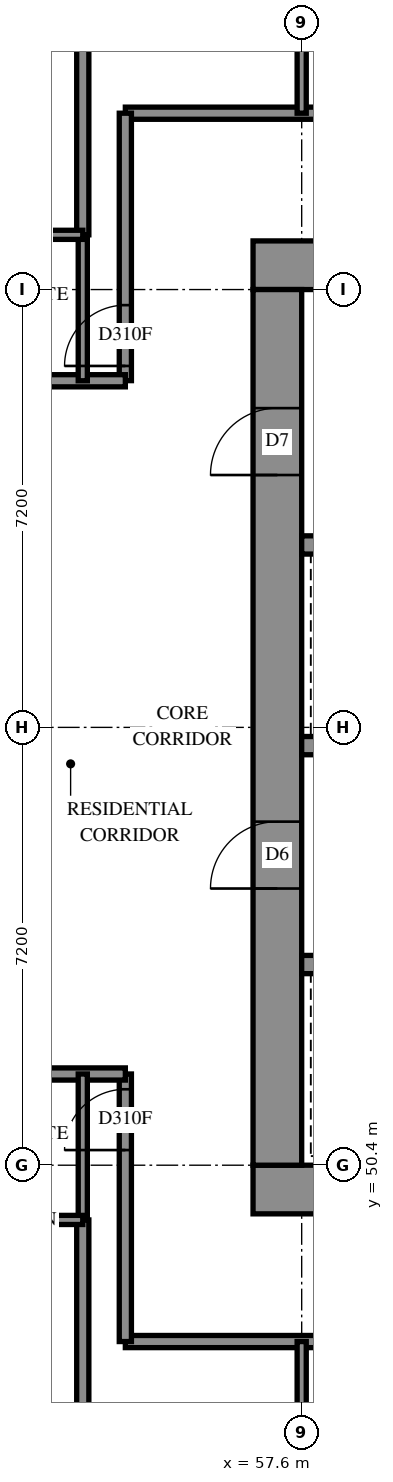
"""IFC4 building model, lengths in metres.
Left out: names, types, materials, properties, quantities, classifications, styles, units other than length and angle.
Written with IfcOpenShell. Run it as: python <this file> out.ifc"""

import sys

from ifc_helpers import new_model, si_unit, direction, frame, frame_2d, origin, place, context, subcontext, project, spatial, rectangle, extrude, element, fill, save


model = new_model("IFC4")
c1 = context("Model", 3, precision=1e-05, world=origin(), true_north=direction((0.0, 1.0)))
c2 = subcontext(c1, "Body", "Model", "MODEL_VIEW")
j1 = project(units=[si_unit("LENGTHUNIT", "METRE"), si_unit("PLANEANGLEUNIT", "RADIAN")], contexts=[c1])
p1 = place(None, origin())
s1 = spatial("IfcSite", under=j1, at=p1, CompositionType="ELEMENT")
p2 = place(p1, origin())
s2 = spatial("IfcBuilding", under=s1, at=p2, CompositionType="ELEMENT")
p3 = place(p2, frame((0.0, 0.0, 91.4)))
s3 = spatial("IfcBuildingStorey", under=s2, at=p3, CompositionType="ELEMENT", Elevation=91.4)
p4 = place(p3, frame((56.8, 50.0, -0.3), z_axis=(0.0, 0.0, 1.0), x_axis=(1.0, 0.0, 0.0)))
e1 = element("IfcWall", 1, at=p4, inside=s3, PredefinedType="SHEAR", context=c2, shape_type="SweptSolid", body=[
    extrude(rectangle(XDim=16.0, YDim=0.8, at=frame_2d((8.0, 0.0))), origin(), (0.0, 0.0, 1.0), 2.7),
])
p5 = place(p3, frame((56.8, 65.2, -0.3), z_axis=(0.0, 0.0, 1.0), x_axis=(1.0, 0.0, 0.0)))
e2 = element("IfcWall", 2, at=p5, inside=s3, PredefinedType="SHEAR", context=c2, shape_type="SweptSolid", body=[
    extrude(rectangle(XDim=16.0, YDim=0.8, at=frame_2d((8.0, 0.0))), origin(), (0.0, 0.0, 1.0), 2.7),
])
p6 = place(p5, frame((10.8, 0.0, 0.3)))
e3 = element("IfcOpeningElement", 3, at=p6, cuts=e2, PredefinedType="OPENING", context=c2, shape_type="SweptSolid", body=[
    extrude(rectangle(XDim=0.8, YDim=2.1, at=frame_2d((0.4, 1.05))), frame((0.0, 0.41, 0.0), z_axis=(0.0, -1.0, 0.0), x_axis=(1.0, 0.0, 0.0)), (0.0, 0.0, 1.0), 0.82),
])
p7 = place(p3, frame((57.2, 50.4, -0.3), z_axis=(0.0, 0.0, 1.0), x_axis=(0.0, 1.0, 0.0)))
e4 = element("IfcWall", 4, at=p7, inside=s3, PredefinedType="SHEAR", context=c2, shape_type="SweptSolid", body=[
    extrude(rectangle(XDim=14.4, YDim=0.8, at=frame_2d((7.2, 0.0))), origin(), (0.0, 0.0, 1.0), 2.7),
])
p8 = place(p7, frame((4.55, 0.0, 0.3)))
e5 = element("IfcOpeningElement", 5, at=p8, cuts=e4, PredefinedType="OPENING", context=c2, shape_type="SweptSolid", body=[
    extrude(rectangle(XDim=1.1, YDim=2.1, at=frame_2d((0.55, 1.05))), frame((0.0, 0.41, 0.0), z_axis=(0.0, -1.0, 0.0), x_axis=(1.0, 0.0, 0.0)), (0.0, 0.0, 1.0), 0.82),
])
p9 = place(p7, frame((11.35, 0.0, 0.3)))
e6 = element("IfcOpeningElement", 6, at=p9, cuts=e4, PredefinedType="OPENING", context=c2, shape_type="SweptSolid", body=[
    extrude(rectangle(XDim=1.1, YDim=2.1, at=frame_2d((0.55, 1.05))), frame((0.0, 0.41, 0.0), z_axis=(0.0, -1.0, 0.0), x_axis=(1.0, 0.0, 0.0)), (0.0, 0.0, 1.0), 0.82),
])
p10 = place(p3, frame((57.6, 53.7, 0.0), z_axis=(0.0, 0.0, 1.0), x_axis=(1.0, 0.0, 0.0)))
e7 = element("IfcWall", 7, at=p10, inside=s3, PredefinedType="SOLIDWALL", context=c2, shape_type="SweptSolid", body=[
    extrude(rectangle(XDim=14.4, YDim=0.3, at=frame_2d((7.2, 0.0))), origin(), (0.0, 0.0, 1.0), 3.1),
])
p11 = place(p10, frame((1.25, 0.0, 0.0)))
e8 = element("IfcOpeningElement", 8, at=p11, cuts=e7, PredefinedType="OPENING", context=c2, shape_type="SweptSolid", body=[
    extrude(rectangle(XDim=1.1, YDim=2.1, at=frame_2d((0.55, 1.05))), frame((0.0, 0.16, 0.0), z_axis=(0.0, -1.0, 0.0), x_axis=(1.0, 0.0, 0.0)), (0.0, 0.0, 1.0), 0.32),
])
p12 = place(p10, frame((4.85, 0.0, 0.0)))
e9 = element("IfcOpeningElement", 9, at=p12, cuts=e7, PredefinedType="OPENING", context=c2, shape_type="SweptSolid", body=[
    extrude(rectangle(XDim=1.1, YDim=2.1, at=frame_2d((0.55, 1.05))), frame((0.0, 0.16, 0.0), z_axis=(0.0, -1.0, 0.0), x_axis=(1.0, 0.0, 0.0)), (0.0, 0.0, 1.0), 0.32),
])
p13 = place(p10, frame((8.45, 0.0, 0.0)))
e10 = element("IfcOpeningElement", 10, at=p13, cuts=e7, PredefinedType="OPENING", context=c2, shape_type="SweptSolid", body=[
    extrude(rectangle(XDim=1.1, YDim=2.1, at=frame_2d((0.55, 1.05))), frame((0.0, 0.16, 0.0), z_axis=(0.0, -1.0, 0.0), x_axis=(1.0, 0.0, 0.0)), (0.0, 0.0, 1.0), 0.32),
])
p14 = place(p10, frame((12.05, 0.0, 0.0)))
e11 = element("IfcOpeningElement", 11, at=p14, cuts=e7, PredefinedType="OPENING", context=c2, shape_type="SweptSolid", body=[
    extrude(rectangle(XDim=1.1, YDim=2.1, at=frame_2d((0.55, 1.05))), frame((0.0, 0.16, 0.0), z_axis=(0.0, -1.0, 0.0), x_axis=(1.0, 0.0, 0.0)), (0.0, 0.0, 1.0), 0.32),
])
p15 = place(p3, frame((57.6, 57.3, 0.0), z_axis=(0.0, 0.0, 1.0), x_axis=(1.0, 0.0, 0.0)))
e12 = element("IfcWall", 12, at=p15, inside=s3, PredefinedType="SOLIDWALL", context=c2, shape_type="SweptSolid", body=[
    extrude(rectangle(XDim=14.4, YDim=0.3, at=frame_2d((7.2, 0.0))), origin(), (0.0, 0.0, 1.0), 3.1),
])
p16 = place(p15, frame((12.05, 0.0, 0.0)))
e13 = element("IfcOpeningElement", 13, at=p16, cuts=e12, PredefinedType="OPENING", context=c2, shape_type="SweptSolid", body=[
    extrude(rectangle(XDim=1.1, YDim=2.1, at=frame_2d((0.55, 1.05))), frame((0.0, 0.16, 0.0), z_axis=(0.0, -1.0, 0.0), x_axis=(1.0, 0.0, 0.0)), (0.0, 0.0, 1.0), 0.32),
])
p17 = place(p3, frame((57.6, 60.6, 0.0), z_axis=(0.0, 0.0, 1.0), x_axis=(1.0, 0.0, 0.0)))
e14 = element("IfcWall", 14, at=p17, inside=s3, PredefinedType="SOLIDWALL", context=c2, shape_type="SweptSolid", body=[
    extrude(rectangle(XDim=7.2, YDim=0.3, at=frame_2d((3.6, 0.0))), origin(), (0.0, 0.0, 1.0), 3.1),
])
p18 = place(p3, frame((54.7, 67.7, 0.0), z_axis=(0.0, 0.0, 1.0), x_axis=(1.0, 0.0, 0.0)))
e15 = element("IfcWall", 15, at=p18, inside=s3, PredefinedType="PARTITIONING", context=c2, shape_type="SweptSolid", body=[
    extrude(rectangle(XDim=20.2, YDim=0.2, at=frame_2d((10.1, 0.0))), origin(), (0.0, 0.0, 1.0), 3.1),
])
p19 = place(p18, frame((5.25, 0.0, 0.0)))
e16 = element("IfcOpeningElement", 16, at=p19, cuts=e15, PredefinedType="OPENING", context=c2, shape_type="SweptSolid", body=[
    extrude(rectangle(XDim=0.9, YDim=2.1, at=frame_2d((0.45, 1.05))), frame((0.0, 0.11, 0.0), z_axis=(0.0, -1.0, 0.0), x_axis=(1.0, 0.0, 0.0)), (0.0, 0.0, 1.0), 0.22),
])
p20 = place(p18, frame((6.9, 0.0, 0.0)))
e17 = element("IfcOpeningElement", 17, at=p20, cuts=e15, PredefinedType="OPENING", context=c2, shape_type="SweptSolid", body=[
    extrude(rectangle(XDim=0.9, YDim=2.1, at=frame_2d((0.45, 1.05))), frame((0.0, 0.11, 0.0), z_axis=(0.0, -1.0, 0.0), x_axis=(1.0, 0.0, 0.0)), (0.0, 0.0, 1.0), 0.22),
])
p21 = place(p18, frame((12.45, 0.0, 0.0)))
e18 = element("IfcOpeningElement", 18, at=p21, cuts=e15, PredefinedType="OPENING", context=c2, shape_type="SweptSolid", body=[
    extrude(rectangle(XDim=0.9, YDim=2.1, at=frame_2d((0.45, 1.05))), frame((0.0, 0.11, 0.0), z_axis=(0.0, -1.0, 0.0), x_axis=(1.0, 0.0, 0.0)), (0.0, 0.0, 1.0), 0.22),
])
p22 = place(p18, frame((14.1, 0.0, 0.0)))
e19 = element("IfcOpeningElement", 19, at=p22, cuts=e15, PredefinedType="OPENING", context=c2, shape_type="SweptSolid", body=[
    extrude(rectangle(XDim=0.9, YDim=2.1, at=frame_2d((0.45, 1.05))), frame((0.0, 0.11, 0.0), z_axis=(0.0, -1.0, 0.0), x_axis=(1.0, 0.0, 0.0)), (0.0, 0.0, 1.0), 0.22),
])
p23 = place(p3, frame((54.7, 47.5, 0.0), z_axis=(0.0, 0.0, 1.0), x_axis=(1.0, 0.0, 0.0)))
e20 = element("IfcWall", 20, at=p23, inside=s3, PredefinedType="PARTITIONING", context=c2, shape_type="SweptSolid", body=[
    extrude(rectangle(XDim=19.442, YDim=0.2, at=frame_2d((9.721, 0.0))), origin(), (0.0, 0.0, 1.0), 3.1),
])
p24 = place(p23, frame((5.2, 0.0, 0.0)))
e21 = element("IfcOpeningElement", 21, at=p24, cuts=e20, PredefinedType="OPENING", context=c2, shape_type="SweptSolid", body=[
    extrude(rectangle(XDim=0.9, YDim=2.1, at=frame_2d((0.45, 1.05))), frame((0.0, 0.11, 0.0), z_axis=(0.0, -1.0, 0.0), x_axis=(1.0, 0.0, 0.0)), (0.0, 0.0, 1.0), 0.22),
])
p25 = place(p23, frame((6.9, 0.0, 0.0)))
e22 = element("IfcOpeningElement", 22, at=p25, cuts=e20, PredefinedType="OPENING", context=c2, shape_type="SweptSolid", body=[
    extrude(rectangle(XDim=0.9, YDim=2.1, at=frame_2d((0.45, 1.05))), frame((0.0, 0.11, 0.0), z_axis=(0.0, -1.0, 0.0), x_axis=(1.0, 0.0, 0.0)), (0.0, 0.0, 1.0), 0.22),
])
p26 = place(p23, frame((13.963, 0.0, 0.0)))
e23 = element("IfcOpeningElement", 23, at=p26, cuts=e20, PredefinedType="OPENING", context=c2, shape_type="SweptSolid", body=[
    extrude(rectangle(XDim=1.0, YDim=2.1, at=frame_2d((0.5, 1.05))), frame((0.0, 0.11, 0.0), z_axis=(0.0, -1.0, 0.0), x_axis=(1.0, 0.0, 0.0)), (0.0, 0.0, 1.0), 0.22),
])
p27 = place(p3, frame((54.0, 42.395, 0.0), z_axis=(0.0, 0.0, 1.0), x_axis=(0.0, 1.0, 0.0)))
e24 = element("IfcWall", 24, at=p27, inside=s3, PredefinedType="PARTITIONING", context=c2, shape_type="SweptSolid", body=[
    extrude(rectangle(XDim=7.104, YDim=0.2, at=frame_2d((3.552, 0.0))), origin(), (0.0, 0.0, 1.0), 3.1),
])
p28 = place(p3, frame((54.0, 65.7, 0.0), z_axis=(0.0, 0.0, 1.0), x_axis=(0.0, 1.0, 0.0)))
e25 = element("IfcWall", 25, at=p28, inside=s3, PredefinedType="PARTITIONING", context=c2, shape_type="SweptSolid", body=[
    extrude(rectangle(XDim=6.993, YDim=0.2, at=frame_2d((3.497, 0.0))), origin(), (0.0, 0.0, 1.0), 3.1),
])
p29 = place(p3, frame((54.7, 47.5, 0.0), z_axis=(0.0, 0.0, 1.0), x_axis=(0.0, 1.0, 0.0)))
e26 = element("IfcWall", 26, at=p29, inside=s3, PredefinedType="PARTITIONING", context=c2, shape_type="SweptSolid", body=[
    extrude(rectangle(XDim=4.4, YDim=0.2, at=frame_2d((2.2, 0.0))), origin(), (0.0, 0.0, 1.0), 3.1),
])
p30 = place(p29, frame((3.149, 0.0, 0.0)))
e27 = element("IfcOpeningElement", 27, at=p30, cuts=e26, PredefinedType="OPENING", context=c2, shape_type="SweptSolid", body=[
    extrude(rectangle(XDim=1.0, YDim=2.1, at=frame_2d((0.5, 1.05))), frame((0.0, 0.11, 0.0), z_axis=(0.0, -1.0, 0.0), x_axis=(1.0, 0.0, 0.0)), (0.0, 0.0, 1.0), 0.22),
])
p31 = place(p3, frame((54.7, 63.302, 0.0), z_axis=(0.0, 0.0, 1.0), x_axis=(0.0, 1.0, 0.0)))
e28 = element("IfcWall", 28, at=p31, inside=s3, PredefinedType="PARTITIONING", context=c2, shape_type="SweptSolid", body=[
    extrude(rectangle(XDim=4.398, YDim=0.2, at=frame_2d((2.199, 0.0))), origin(), (0.0, 0.0, 1.0), 3.1),
])
p32 = place(p31, frame((0.242, 0.0, 0.0)))
e29 = element("IfcOpeningElement", 29, at=p32, cuts=e28, PredefinedType="OPENING", context=c2, shape_type="SweptSolid", body=[
    extrude(rectangle(XDim=1.0, YDim=2.1, at=frame_2d((0.5, 1.05))), frame((0.0, 0.11, 0.0), z_axis=(0.0, -1.0, 0.0), x_axis=(1.0, 0.0, 0.0)), (0.0, 0.0, 1.0), 0.22),
])
p33 = place(p3, frame((50.4, 51.9, 0.0), z_axis=(0.0, 0.0, 1.0), x_axis=(1.0, 0.0, 0.0)))
e30 = element("IfcWall", 30, at=p33, inside=s3, PredefinedType="PARTITIONING", context=c2, shape_type="SweptSolid", body=[
    extrude(rectangle(XDim=4.3, YDim=0.2, at=frame_2d((2.15, 0.0))), origin(), (0.0, 0.0, 1.0), 3.1),
])
p34 = place(p33, frame((0.552, 0.0, 0.0)))
e31 = element("IfcOpeningElement", 31, at=p34, cuts=e30, PredefinedType="OPENING", context=c2, shape_type="SweptSolid", body=[
    extrude(rectangle(XDim=0.9, YDim=2.1, at=frame_2d((0.45, 1.05))), frame((0.0, 0.11, 0.0), z_axis=(0.0, -1.0, 0.0), x_axis=(1.0, 0.0, 0.0)), (0.0, 0.0, 1.0), 0.22),
])
p35 = place(p3, frame((50.4, 63.3, 0.0), z_axis=(0.0, 0.0, 1.0), x_axis=(1.0, 0.0, 0.0)))
e32 = element("IfcWall", 32, at=p35, inside=s3, PredefinedType="PARTITIONING", context=c2, shape_type="SweptSolid", body=[
    extrude(rectangle(XDim=4.3, YDim=0.2, at=frame_2d((2.15, 0.0))), origin(), (0.0, 0.0, 1.0), 3.1),
])
p36 = place(p35, frame((0.552, 0.0, 0.0)))
e33 = element("IfcOpeningElement", 33, at=p36, cuts=e32, PredefinedType="OPENING", context=c2, shape_type="SweptSolid", body=[
    extrude(rectangle(XDim=0.9, YDim=2.1, at=frame_2d((0.45, 1.05))), frame((0.0, 0.11, 0.0), z_axis=(0.0, -1.0, 0.0), x_axis=(1.0, 0.0, 0.0)), (0.0, 0.0, 1.0), 0.22),
])
for number, where, z_axis, x_axis in (
    (34, (54.0, 63.3, 0.0), (0.0, 0.0, 1.0), (0.0, 1.0, 0.0)),
    (35, (54.0, 49.5, 0.0), (0.0, 0.0, 1.0), (0.0, 1.0, 0.0)),
    (36, (57.6, 45.1, 0.0), (0.0, 0.0, 1.0), (0.0, 1.0, 0.0)),
    (37, (57.6, 67.7, 0.0), (0.0, 0.0, 1.0), (0.0, 1.0, 0.0)),
):
    element("IfcWall", number, at=place(p3, frame(where, z_axis=z_axis, x_axis=x_axis)), inside=s3, PredefinedType="PARTITIONING", context=c2, shape_type="SweptSolid", body=[
        extrude(rectangle(XDim=2.4, YDim=0.15, at=frame_2d((1.2, 0.0))), origin(), (0.0, 0.0, 1.0), 3.1),
    ])
p37 = place(p3, frame((52.1, 49.5, 0.0), z_axis=(0.0, 0.0, 1.0), x_axis=(1.0, 0.0, 0.0)))
e38 = element("IfcWall", 38, at=p37, inside=s3, PredefinedType="PARTITIONING", context=c2, shape_type="SweptSolid", body=[
    extrude(rectangle(XDim=1.9, YDim=0.15, at=frame_2d((0.95, 0.0))), origin(), (0.0, 0.0, 1.0), 3.1),
])
p38 = place(p37, frame((0.598, 0.0, 0.0)))
e39 = element("IfcOpeningElement", 39, at=p38, cuts=e38, PredefinedType="OPENING", context=c2, shape_type="SweptSolid", body=[
    extrude(rectangle(XDim=0.8, YDim=2.1, at=frame_2d((0.4, 1.05))), frame((0.0, 0.085, 0.0), z_axis=(0.0, -1.0, 0.0), x_axis=(1.0, 0.0, 0.0)), (0.0, 0.0, 1.0), 0.17),
])
p39 = place(p3, frame((52.1, 65.7, 0.0), z_axis=(0.0, 0.0, 1.0), x_axis=(1.0, 0.0, 0.0)))
e40 = element("IfcWall", 40, at=p39, inside=s3, PredefinedType="PARTITIONING", context=c2, shape_type="SweptSolid", body=[
    extrude(rectangle(XDim=1.9, YDim=0.15, at=frame_2d((0.95, 0.0))), origin(), (0.0, 0.0, 1.0), 3.1),
])
p40 = place(p39, frame((0.493, 0.0, 0.0)))
e41 = element("IfcOpeningElement", 41, at=p40, cuts=e40, PredefinedType="OPENING", context=c2, shape_type="SweptSolid", body=[
    extrude(rectangle(XDim=0.8, YDim=2.1, at=frame_2d((0.4, 1.05))), frame((0.0, 0.085, 0.0), z_axis=(0.0, -1.0, 0.0), x_axis=(1.0, 0.0, 0.0)), (0.0, 0.0, 1.0), 0.17),
])
p41 = place(p8, origin())
e42 = element("IfcDoor", 42, at=p41, inside=s3, OperationType="DOUBLE_DOOR_SINGLE_SWING", PredefinedType="DOOR", context=c2, shape_type="SweptSolid", body=[
    extrude(rectangle(XDim=1.1, YDim=2.1, at=frame_2d((0.55, 1.05))), frame((0.0, 0.025, 0.0), z_axis=(0.0, -1.0, 0.0), x_axis=(1.0, 0.0, 0.0)), (0.0, 0.0, 1.0), 0.05),
])
fill(e5, e42)
p42 = place(p9, origin())
e43 = element("IfcDoor", 43, at=p42, inside=s3, OperationType="SINGLE_SWING_LEFT", PredefinedType="DOOR", context=c2, shape_type="SweptSolid", body=[
    extrude(rectangle(XDim=1.1, YDim=2.1, at=frame_2d((0.55, 1.05))), frame((0.0, 0.025, 0.0), z_axis=(0.0, -1.0, 0.0), x_axis=(1.0, 0.0, 0.0)), (0.0, 0.0, 1.0), 0.05),
])
fill(e6, e43)
p43 = place(p32, origin())
e44 = element("IfcDoor", 44, at=p43, inside=s3, OperationType="SINGLE_SWING_LEFT", PredefinedType="DOOR", context=c2, shape_type="SweptSolid", body=[
    extrude(rectangle(XDim=1.0, YDim=2.1, at=frame_2d((0.5, 1.05))), frame((0.0, 0.025, 0.0), z_axis=(0.0, -1.0, 0.0), x_axis=(1.0, 0.0, 0.0)), (0.0, 0.0, 1.0), 0.05),
])
fill(e29, e44)
p44 = place(p30, origin())
e45 = element("IfcDoor", 45, at=p44, inside=s3, OperationType="SINGLE_SWING_RIGHT", PredefinedType="DOOR", context=c2, shape_type="SweptSolid", body=[
    extrude(rectangle(XDim=1.0, YDim=2.1, at=frame_2d((0.5, 1.05))), frame((0.0, 0.025, 0.0), z_axis=(0.0, -1.0, 0.0), x_axis=(1.0, 0.0, 0.0)), (0.0, 0.0, 1.0), 0.05),
])
fill(e27, e45)
save(model, sys.argv[1])
